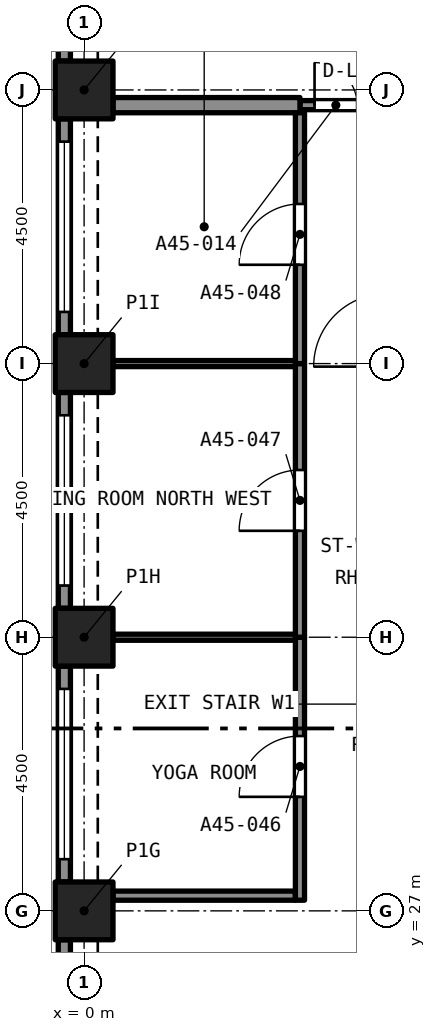
"""IFC4 building model, lengths in metres.
Left out: names, types, materials, properties, quantities, classifications, styles, units other than length and angle.
Written with IfcOpenShell. Run it as: python <this file> out.ifc"""

import sys

from ifc_helpers import new_model, si_unit, direction, frame, frame_2d, origin, origin_2d, place, context, subcontext, project, spatial, rectangle, extrude, element, fill, save


model = new_model("IFC4")
c1 = context("Model", 3, precision=1e-05, world=origin(), true_north=direction((0.0, 1.0)))
c2 = subcontext(c1, "Body", "Model", "MODEL_VIEW")
j1 = project(units=[si_unit("LENGTHUNIT", "METRE"), si_unit("PLANEANGLEUNIT", "RADIAN")], contexts=[c1])
p1 = place(None, origin())
s1 = spatial("IfcSite", under=j1, at=p1, CompositionType="ELEMENT")
p2 = place(p1, origin())
s2 = spatial("IfcBuilding", under=s1, at=p2, CompositionType="ELEMENT")
p3 = place(p2, frame((0.0, 0.0, 163.8)))
s3 = spatial("IfcBuildingStorey", under=s2, at=p3, CompositionType="ELEMENT", Elevation=163.8)
for number, where, z_axis, x_axis in (
    (1, (0.0, 27.0, 0.0), (0.0, 0.0, 1.0), (1.0, 0.0, 0.0)),
    (2, (0.0, 31.5, 0.0), (0.0, 0.0, 1.0), (1.0, 0.0, 0.0)),
    (3, (0.0, 36.0, 0.0), (0.0, 0.0, 1.0), (1.0, 0.0, 0.0)),
    (4, (0.0, 40.5, 0.0), (0.0, 0.0, 1.0), (1.0, 0.0, 0.0)),
):
    element("IfcColumn", number, at=place(p3, frame(where, z_axis=z_axis, x_axis=x_axis)), inside=s3, PredefinedType="COLUMN", context=c2, shape_type="SweptSolid", body=[
        extrude(rectangle(XDim=0.95, YDim=0.95, at=origin_2d()), origin(), (0.0, 0.0, 1.0), 4.4),
    ])
p4 = place(p3, frame((-0.325, 40.975, 0.0), z_axis=(0.0, 0.0, 1.0), x_axis=(0.0, 1.0, 0.0)))
e5 = element("IfcWall", 5, at=p4, inside=s3, PredefinedType="SOLIDWALL", context=c2, shape_type="SweptSolid", body=[
    extrude(rectangle(XDim=3.55, YDim=0.2, at=frame_2d((1.775, 0.0))), origin(), (0.0, 0.0, 1.0), 4.4),
])
p5 = place(p4, frame((0.375, 0.0, 0.45)))
e6 = element("IfcOpeningElement", 6, at=p5, cuts=e5, PredefinedType="OPENING", context=c2, shape_type="SweptSolid", body=[
    extrude(rectangle(XDim=2.8, YDim=2.55, at=frame_2d((1.4, 1.275))), frame((0.0, 0.11, 0.0), z_axis=(0.0, -1.0, 0.0), x_axis=(1.0, 0.0, 0.0)), (0.0, 0.0, 1.0), 0.22),
])
p6 = place(p3, frame((-0.325, 36.475, 0.0), z_axis=(0.0, 0.0, 1.0), x_axis=(0.0, 1.0, 0.0)))
e7 = element("IfcWall", 7, at=p6, inside=s3, PredefinedType="SOLIDWALL", context=c2, shape_type="SweptSolid", body=[
    extrude(rectangle(XDim=3.55, YDim=0.2, at=frame_2d((1.775, 0.0))), origin(), (0.0, 0.0, 1.0), 4.4),
])
p7 = place(p6, frame((0.375, 0.0, 0.45)))
e8 = element("IfcOpeningElement", 8, at=p7, cuts=e7, PredefinedType="OPENING", context=c2, shape_type="SweptSolid", body=[
    extrude(rectangle(XDim=2.8, YDim=2.55, at=frame_2d((1.4, 1.275))), frame((0.0, 0.11, 0.0), z_axis=(0.0, -1.0, 0.0), x_axis=(1.0, 0.0, 0.0)), (0.0, 0.0, 1.0), 0.22),
])
p8 = place(p3, frame((-0.325, 31.975, 0.0), z_axis=(0.0, 0.0, 1.0), x_axis=(0.0, 1.0, 0.0)))
e9 = element("IfcWall", 9, at=p8, inside=s3, PredefinedType="SOLIDWALL", context=c2, shape_type="SweptSolid", body=[
    extrude(rectangle(XDim=3.55, YDim=0.2, at=frame_2d((1.775, 0.0))), origin(), (0.0, 0.0, 1.0), 4.4),
])
p9 = place(p8, frame((0.375, 0.0, 0.45)))
e10 = element("IfcOpeningElement", 10, at=p9, cuts=e9, PredefinedType="OPENING", context=c2, shape_type="SweptSolid", body=[
    extrude(rectangle(XDim=2.8, YDim=2.55, at=frame_2d((1.4, 1.275))), frame((0.0, 0.11, 0.0), z_axis=(0.0, -1.0, 0.0), x_axis=(1.0, 0.0, 0.0)), (0.0, 0.0, 1.0), 0.22),
])
p10 = place(p3, frame((-0.325, 27.475, 0.0), z_axis=(0.0, 0.0, 1.0), x_axis=(0.0, 1.0, 0.0)))
e11 = element("IfcWall", 11, at=p10, inside=s3, PredefinedType="SOLIDWALL", context=c2, shape_type="SweptSolid", body=[
    extrude(rectangle(XDim=3.55, YDim=0.2, at=frame_2d((1.775, 0.0))), origin(), (0.0, 0.0, 1.0), 4.4),
])
p11 = place(p10, frame((0.375, 0.0, 0.45)))
e12 = element("IfcOpeningElement", 12, at=p11, cuts=e11, PredefinedType="OPENING", context=c2, shape_type="SweptSolid", body=[
    extrude(rectangle(XDim=2.8, YDim=2.55, at=frame_2d((1.4, 1.275))), frame((0.0, 0.11, 0.0), z_axis=(0.0, -1.0, 0.0), x_axis=(1.0, 0.0, 0.0)), (0.0, 0.0, 1.0), 0.22),
])
p12 = place(p3, frame((-0.325, 22.975, 0.0), z_axis=(0.0, 0.0, 1.0), x_axis=(0.0, 1.0, 0.0)))
e13 = element("IfcWall", 13, at=p12, inside=s3, PredefinedType="SOLIDWALL", context=c2, shape_type="SweptSolid", body=[
    extrude(rectangle(XDim=3.55, YDim=0.2, at=frame_2d((1.775, 0.0))), origin(), (0.0, 0.0, 1.0), 4.4),
])
p13 = place(p12, frame((0.375, 0.0, 0.45)))
e14 = element("IfcOpeningElement", 14, at=p13, cuts=e13, PredefinedType="OPENING", context=c2, shape_type="SweptSolid", body=[
    extrude(rectangle(XDim=2.8, YDim=2.55, at=frame_2d((1.4, 1.275))), frame((0.0, 0.11, 0.0), z_axis=(0.0, -1.0, 0.0), x_axis=(1.0, 0.0, 0.0)), (0.0, 0.0, 1.0), 0.22),
])
p14 = place(p3, frame((3.55, 40.25, 0.0), z_axis=(0.0, 0.0, 1.0), x_axis=(1.0, 0.0, 0.0)))
e15 = element("IfcWall", 15, at=p14, inside=s3, PredefinedType="PARTITIONING", context=c2, shape_type="SweptSolid", body=[
    extrude(rectangle(XDim=1.2, YDim=0.15, at=frame_2d((0.6, 0.0))), origin(), (0.0, 0.0, 1.0), 4.1),
])
p15 = place(p14, frame((0.24, 0.0, 0.0)))
e16 = element("IfcOpeningElement", 16, at=p15, cuts=e15, PredefinedType="OPENING", context=c2, shape_type="SweptSolid", body=[
    extrude(rectangle(XDim=0.7, YDim=2.1, at=frame_2d((0.35, 1.05))), frame((0.0, 0.085, 0.0), z_axis=(0.0, -1.0, 0.0), x_axis=(1.0, 0.0, 0.0)), (0.0, 0.0, 1.0), 0.17),
])
p16 = place(p3, frame((0.475, 40.25, 0.0), z_axis=(0.0, 0.0, 1.0), x_axis=(1.0, 0.0, 0.0)))
e17 = element("IfcWall", 17, at=p16, inside=s3, PredefinedType="PARTITIONING", context=c2, shape_type="SweptSolid", body=[
    extrude(rectangle(XDim=3.075, YDim=0.25, at=frame_2d((1.538, 0.0))), origin(), (0.0, 0.0, 1.0), 4.1),
])
p17 = place(p3, frame((0.475, 27.25, 0.0), z_axis=(0.0, 0.0, 1.0), x_axis=(1.0, 0.0, 0.0)))
e18 = element("IfcWall", 18, at=p17, inside=s3, PredefinedType="PARTITIONING", context=c2, shape_type="SweptSolid", body=[
    extrude(rectangle(XDim=3.0, YDim=0.15, at=frame_2d((1.5, 0.0))), origin(), (0.0, 0.0, 1.0), 4.1),
])
p18 = place(p3, frame((3.55, 27.175, 0.0), z_axis=(0.0, 0.0, 1.0), x_axis=(0.0, 1.0, 0.0)))
e19 = element("IfcWall", 19, at=p18, inside=s3, PredefinedType="PARTITIONING", context=c2, shape_type="SweptSolid", body=[
    extrude(rectangle(XDim=4.325, YDim=0.15, at=frame_2d((2.163, 0.0))), origin(), (0.0, 0.0, 1.0), 4.1),
])
p19 = place(p18, frame((1.7, 0.0, 0.0)))
e20 = element("IfcOpeningElement", 20, at=p19, cuts=e19, PredefinedType="OPENING", context=c2, shape_type="SweptSolid", body=[
    extrude(rectangle(XDim=1.0, YDim=2.1, at=frame_2d((0.5, 1.05))), frame((0.0, 0.085, 0.0), z_axis=(0.0, -1.0, 0.0), x_axis=(1.0, 0.0, 0.0)), (0.0, 0.0, 1.0), 0.17),
])
p20 = place(p3, frame((3.55, 31.5, 0.0), z_axis=(0.0, 0.0, 1.0), x_axis=(0.0, 1.0, 0.0)))
e21 = element("IfcWall", 21, at=p20, inside=s3, PredefinedType="PARTITIONING", context=c2, shape_type="SweptSolid", body=[
    extrude(rectangle(XDim=4.5, YDim=0.15, at=frame_2d((2.25, 0.0))), origin(), (0.0, 0.0, 1.0), 4.1),
])
p21 = place(p20, frame((1.75, 0.0, 0.0)))
e22 = element("IfcOpeningElement", 22, at=p21, cuts=e21, PredefinedType="OPENING", context=c2, shape_type="SweptSolid", body=[
    extrude(rectangle(XDim=1.0, YDim=2.1, at=frame_2d((0.5, 1.05))), frame((0.0, 0.085, 0.0), z_axis=(0.0, -1.0, 0.0), x_axis=(1.0, 0.0, 0.0)), (0.0, 0.0, 1.0), 0.17),
])
p22 = place(p3, frame((3.55, 36.0, 0.0), z_axis=(0.0, 0.0, 1.0), x_axis=(0.0, 1.0, 0.0)))
e23 = element("IfcWall", 23, at=p22, inside=s3, PredefinedType="PARTITIONING", context=c2, shape_type="SweptSolid", body=[
    extrude(rectangle(XDim=4.125, YDim=0.15, at=frame_2d((2.062, 0.0))), origin(), (0.0, 0.0, 1.0), 4.1),
])
p23 = place(p22, frame((1.625, 0.0, 0.0)))
e24 = element("IfcOpeningElement", 24, at=p23, cuts=e23, PredefinedType="OPENING", context=c2, shape_type="SweptSolid", body=[
    extrude(rectangle(XDim=1.0, YDim=2.1, at=frame_2d((0.5, 1.05))), frame((0.0, 0.085, 0.0), z_axis=(0.0, -1.0, 0.0), x_axis=(1.0, 0.0, 0.0)), (0.0, 0.0, 1.0), 0.17),
])
for number, where, z_axis, x_axis in (
    (25, (0.475, 31.5, 0.0), (0.0, 0.0, 1.0), (1.0, 0.0, 0.0)),
    (26, (0.475, 36.0, 0.0), (0.0, 0.0, 1.0), (1.0, 0.0, 0.0)),
):
    element("IfcWall", number, at=place(p3, frame(where, z_axis=z_axis, x_axis=x_axis)), inside=s3, PredefinedType="PARTITIONING", context=c2, shape_type="SweptSolid", body=[
        extrude(rectangle(XDim=3.0, YDim=0.1, at=frame_2d((1.5, 0.0))), origin(), (0.0, 0.0, 1.0), 4.1),
    ])
p24 = place(p7, origin())
e27 = element("IfcWindow", 27, at=p24, inside=s3, PartitioningType="SINGLE_PANEL", PredefinedType="WINDOW", context=c2, shape_type="SweptSolid", body=[
    extrude(rectangle(XDim=2.8, YDim=2.55, at=frame_2d((1.4, 1.275))), frame((0.0, 0.03, 0.0), z_axis=(0.0, -1.0, 0.0), x_axis=(1.0, 0.0, 0.0)), (0.0, 0.0, 1.0), 0.06),
])
fill(e8, e27)
p25 = place(p9, origin())
e28 = element("IfcWindow", 28, at=p25, inside=s3, PartitioningType="SINGLE_PANEL", PredefinedType="WINDOW", context=c2, shape_type="SweptSolid", body=[
    extrude(rectangle(XDim=2.8, YDim=2.55, at=frame_2d((1.4, 1.275))), frame((0.0, 0.03, 0.0), z_axis=(0.0, -1.0, 0.0), x_axis=(1.0, 0.0, 0.0)), (0.0, 0.0, 1.0), 0.06),
])
fill(e10, e28)
p26 = place(p11, origin())
e29 = element("IfcWindow", 29, at=p26, inside=s3, PartitioningType="SINGLE_PANEL", PredefinedType="WINDOW", context=c2, shape_type="SweptSolid", body=[
    extrude(rectangle(XDim=2.8, YDim=2.55, at=frame_2d((1.4, 1.275))), frame((0.0, 0.03, 0.0), z_axis=(0.0, -1.0, 0.0), x_axis=(1.0, 0.0, 0.0)), (0.0, 0.0, 1.0), 0.06),
])
fill(e12, e29)
p27 = place(p15, origin())
e30 = element("IfcDoor", 30, at=p27, inside=s3, OperationType="SINGLE_SWING_LEFT", PredefinedType="DOOR", context=c2, shape_type="SweptSolid", body=[
    extrude(rectangle(XDim=0.7, YDim=2.1, at=frame_2d((0.35, 1.05))), frame((0.0, 0.025, 0.0), z_axis=(0.0, -1.0, 0.0), x_axis=(1.0, 0.0, 0.0)), (0.0, 0.0, 1.0), 0.05),
])
fill(e16, e30)
p28 = place(p19, origin())
e31 = element("IfcDoor", 31, at=p28, inside=s3, OperationType="SINGLE_SWING_RIGHT", PredefinedType="DOOR", context=c2, shape_type="SweptSolid", body=[
    extrude(rectangle(XDim=1.0, YDim=2.1, at=frame_2d((0.5, 1.05))), frame((0.0, 0.025, 0.0), z_axis=(0.0, -1.0, 0.0), x_axis=(1.0, 0.0, 0.0)), (0.0, 0.0, 1.0), 0.05),
])
fill(e20, e31)
p29 = place(p21, origin())
e32 = element("IfcDoor", 32, at=p29, inside=s3, OperationType="SINGLE_SWING_RIGHT", PredefinedType="DOOR", context=c2, shape_type="SweptSolid", body=[
    extrude(rectangle(XDim=1.0, YDim=2.1, at=frame_2d((0.5, 1.05))), frame((0.0, 0.025, 0.0), z_axis=(0.0, -1.0, 0.0), x_axis=(1.0, 0.0, 0.0)), (0.0, 0.0, 1.0), 0.05),
])
fill(e22, e32)
p30 = place(p23, origin())
e33 = element("IfcDoor", 33, at=p30, inside=s3, OperationType="SINGLE_SWING_RIGHT", PredefinedType="DOOR", context=c2, shape_type="SweptSolid", body=[
    extrude(rectangle(XDim=1.0, YDim=2.1, at=frame_2d((0.5, 1.05))), frame((0.0, 0.025, 0.0), z_axis=(0.0, -1.0, 0.0), x_axis=(1.0, 0.0, 0.0)), (0.0, 0.0, 1.0), 0.05),
])
fill(e24, e33)
save(model, sys.argv[1])
